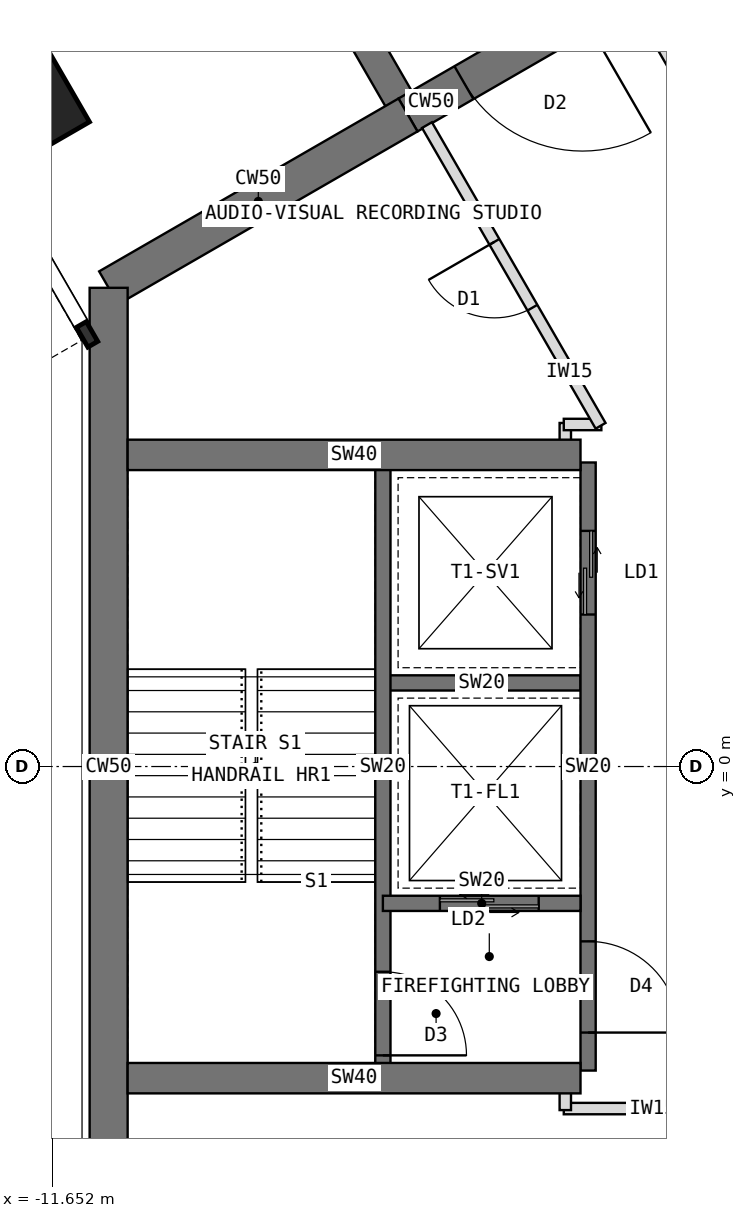
"""IFC4 building model, lengths in metres.
Left out: names, types, materials, properties, quantities, classifications, styles, units other than length and angle.
Written with IfcOpenShell. Run it as: python <this file> out.ifc"""

import sys

from ifc_helpers import new_model, si_unit, direction, frame, frame_2d, origin, origin_2d, place, context, subcontext, project, spatial, rectangle, extrude, element, fill, save


model = new_model("IFC4")
c1 = context("Model", 3, precision=1e-05, world=origin(), true_north=direction((0.0, 1.0)))
c2 = subcontext(c1, "Body", "Model", "MODEL_VIEW")
j1 = project(units=[si_unit("LENGTHUNIT", "METRE"), si_unit("PLANEANGLEUNIT", "RADIAN")], contexts=[c1])
p1 = place(None, origin())
s1 = spatial("IfcSite", under=j1, at=p1, CompositionType="ELEMENT")
p2 = place(p1, origin())
s2 = spatial("IfcBuilding", under=s1, at=p2, CompositionType="ELEMENT")
p3 = place(p2, frame((0.0, 0.0, 194.5)))
s3 = spatial("IfcBuildingStorey", under=s2, at=p3, CompositionType="ELEMENT", Elevation=194.5)
p4 = place(p3, frame((-3.939, 10.322, 0.0), z_axis=(0.0, 0.0, 1.0), x_axis=(-0.866019471182, -0.500010275428, 0.0)))
e1 = element("IfcWall", 1, at=p4, inside=s3, PredefinedType="SHEAR", context=c2, shape_type="SweptSolid", body=[
    extrude(rectangle(XDim=3.5, YDim=0.5, at=frame_2d((1.75, 0.0))), origin(), (0.0, 0.0, 1.0), 4.0),
])
p5 = place(p4, frame((0.85, 0.0, 0.0)))
e2 = element("IfcOpeningElement", 2, at=p5, cuts=e1, PredefinedType="OPENING", context=c2, shape_type="SweptSolid", body=[
    extrude(rectangle(XDim=1.8, YDim=2.1, at=frame_2d((0.9, 1.05))), frame((0.0, 0.26, 0.0), z_axis=(0.0, -1.0, 0.0), x_axis=(1.0, 0.0, 0.0)), (0.0, 0.0, 1.0), 0.52),
])
p6 = place(p3, frame((-6.97, 8.572, 0.0), z_axis=(0.0, 0.0, 1.0), x_axis=(-0.866034513004, -0.499984222037, 0.0)))
e3 = element("IfcWall", 3, at=p6, inside=s3, PredefinedType="SHEAR", context=c2, shape_type="SweptSolid", body=[
    extrude(rectangle(XDim=4.548, YDim=0.5, at=frame_2d((2.274, 0.0))), origin(), (0.0, 0.0, 1.0), 4.0),
])
p7 = place(p3, frame((-10.908, 6.298, 0.0), z_axis=(0.0, 0.0, 1.0), x_axis=(0.0, -1.0, 0.0)))
e4 = element("IfcWall", 4, at=p7, inside=s3, PredefinedType="SHEAR", context=c2, shape_type="SweptSolid", body=[
    extrude(rectangle(XDim=12.596, YDim=0.5, at=frame_2d((6.298, 0.0))), origin(), (0.0, 0.0, 1.0), 4.0),
])
p8 = place(p3, frame((-6.97, 8.572, 0.0), z_axis=(0.0, 0.0, 1.0), x_axis=(-0.499988811324, 0.866031863473, 0.0)))
e5 = element("IfcWall", 5, at=p8, inside=s3, PredefinedType="SHEAR", context=c2, shape_type="SweptSolid", body=[
    extrude(rectangle(XDim=2.592, YDim=0.4, at=frame_2d((1.296, 0.0))), origin(), (0.0, 0.0, 1.0), 4.0),
])
p9 = place(p3, frame((-11.946, 8.691, 0.0), z_axis=(0.0, 0.0, 1.0), x_axis=(0.866025403784, 0.5, 0.0)))
e6 = element("IfcColumn", 6, at=p9, inside=s3, PredefinedType="COLUMN", context=c2, shape_type="SweptSolid", body=[
    extrude(rectangle(XDim=1.15, YDim=1.15, at=origin_2d()), origin(), (0.0, 0.0, 1.0), 4.0),
])
p10 = place(p3, frame((-4.6, 4.0, 0.0), z_axis=(0.0, 0.0, 1.0), x_axis=(0.0, -1.0, 0.0)))
e7 = element("IfcWall", 7, at=p10, inside=s3, PredefinedType="SHEAR", context=c2, shape_type="SweptSolid", body=[
    extrude(rectangle(XDim=8.0, YDim=0.2, at=frame_2d((4.0, 0.0))), origin(), (0.0, 0.0, 1.0), 4.0),
])
p11 = place(p10, frame((6.3, 0.0, 0.0)))
e8 = element("IfcOpeningElement", 8, at=p11, cuts=e7, PredefinedType="OPENING", context=c2, shape_type="SweptSolid", body=[
    extrude(rectangle(XDim=1.2, YDim=2.1, at=frame_2d((0.6, 1.05))), frame((0.0, 0.11, 0.0), z_axis=(0.0, -1.0, 0.0), x_axis=(1.0, 0.0, 0.0)), (0.0, 0.0, 1.0), 0.22),
])
p12 = place(p10, frame((0.9, 0.0, 0.0)))
e9 = element("IfcOpeningElement", 9, at=p12, cuts=e7, PredefinedType="OPENING", context=c2, shape_type="SweptSolid", body=[
    extrude(rectangle(XDim=1.1, YDim=2.2, at=frame_2d((0.55, 1.1))), frame((0.0, 0.11, 0.0), z_axis=(0.0, -1.0, 0.0), x_axis=(1.0, 0.0, 0.0)), (0.0, 0.0, 1.0), 0.22),
])
p13 = place(p3, frame((-4.7, 1.1, 0.0), z_axis=(0.0, 0.0, 1.0), x_axis=(-1.0, 0.0, 0.0)))
e10 = element("IfcWall", 10, at=p13, inside=s3, PredefinedType="SHEAR", context=c2, shape_type="SweptSolid", body=[
    extrude(rectangle(XDim=2.6, YDim=0.2, at=frame_2d((1.3, 0.0))), origin(), (0.0, 0.0, 1.0), 4.0),
])
p14 = place(p3, frame((-4.7, -1.8, 0.0), z_axis=(0.0, 0.0, 1.0), x_axis=(-1.0, 0.0, 0.0)))
e11 = element("IfcWall", 11, at=p14, inside=s3, PredefinedType="SHEAR", context=c2, shape_type="SweptSolid", body=[
    extrude(rectangle(XDim=2.6, YDim=0.2, at=frame_2d((1.3, 0.0))), origin(), (0.0, 0.0, 1.0), 4.0),
])
p15 = place(p14, frame((0.55, 0.0, 0.0)))
e12 = element("IfcOpeningElement", 12, at=p15, cuts=e11, PredefinedType="OPENING", context=c2, shape_type="SweptSolid", body=[
    extrude(rectangle(XDim=1.3, YDim=2.2, at=frame_2d((0.65, 1.1))), frame((0.0, 0.11, 0.0), z_axis=(0.0, -1.0, 0.0), x_axis=(1.0, 0.0, 0.0)), (0.0, 0.0, 1.0), 0.22),
])
p16 = place(p3, frame((-7.3, 4.0, 0.0), z_axis=(0.0, 0.0, 1.0), x_axis=(0.0, -1.0, 0.0)))
e13 = element("IfcWall", 13, at=p16, inside=s3, PredefinedType="SHEAR", context=c2, shape_type="SweptSolid", body=[
    extrude(rectangle(XDim=8.0, YDim=0.2, at=frame_2d((4.0, 0.0))), origin(), (0.0, 0.0, 1.0), 4.0),
])
p17 = place(p16, frame((6.7, 0.0, 0.0)))
e14 = element("IfcOpeningElement", 14, at=p17, cuts=e13, PredefinedType="OPENING", context=c2, shape_type="SweptSolid", body=[
    extrude(rectangle(XDim=1.1, YDim=2.1, at=frame_2d((0.55, 1.05))), frame((0.0, 0.11, 0.0), z_axis=(0.0, -1.0, 0.0), x_axis=(1.0, 0.0, 0.0)), (0.0, 0.0, 1.0), 0.22),
])
for number, where, z_axis, x_axis in (
    (15, (-4.7, -4.1, 0.0), (0.0, 0.0, 1.0), (-1.0, 0.0, 0.0)),
    (16, (-4.7, 4.1, 0.0), (0.0, 0.0, 1.0), (-1.0, 0.0, 0.0)),
):
    element("IfcWall", number, at=place(p3, frame(where, z_axis=z_axis, x_axis=x_axis)), inside=s3, PredefinedType="SHEAR", context=c2, shape_type="SweptSolid", body=[
        extrude(rectangle(XDim=5.958, YDim=0.4, at=frame_2d((2.979, 0.0))), origin(), (0.0, 0.0, 1.0), 4.0),
    ])
p18 = place(p3, frame((-2.578, -4.5, 0.0), z_axis=(0.0, 0.0, 1.0), x_axis=(-1.0, 0.0, 0.0)))
e17 = element("IfcWall", 17, at=p18, inside=s3, PredefinedType="PARTITIONING", context=c2, shape_type="SweptSolid", body=[
    extrude(rectangle(XDim=2.342, YDim=0.15, at=frame_2d((1.171, 0.0))), origin(), (0.0, 0.0, 1.0), 3.8),
])
for number, where, z_axis, x_axis in (
    (18, (-4.9, -4.52, 0.0), (0.0, 0.0, 1.0), (0.0, 1.0, 0.0)),
    (19, (-4.9, 4.09, 0.0), (0.0, 0.0, 1.0), (0.0, 1.0, 0.0)),
):
    element("IfcWall", number, at=place(p3, frame(where, z_axis=z_axis, x_axis=x_axis)), inside=s3, PredefinedType="PARTITIONING", context=c2, shape_type="SweptSolid", body=[
        extrude(rectangle(XDim=0.43, YDim=0.15, at=frame_2d((0.215, 0.0))), origin(), (0.0, 0.0, 1.0), 3.8),
    ])
p19 = place(p3, frame((-4.92, 4.5, 0.0), z_axis=(0.0, 0.0, 1.0), x_axis=(1.0, 0.0, 0.0)))
e20 = element("IfcWall", 20, at=p19, inside=s3, PredefinedType="PARTITIONING", context=c2, shape_type="SweptSolid", body=[
    extrude(rectangle(XDim=0.494, YDim=0.15, at=frame_2d((0.247, 0.0))), origin(), (0.0, 0.0, 1.0), 3.8),
])
p20 = place(p3, frame((-4.436, 4.483, 0.0), z_axis=(0.0, 0.0, 1.0), x_axis=(-0.500001558674, 0.866024503882, 0.0)))
e21 = element("IfcWall", 21, at=p20, inside=s3, PredefinedType="PARTITIONING", context=c2, shape_type="SweptSolid", body=[
    extrude(rectangle(XDim=4.568, YDim=0.15, at=frame_2d((2.284, 0.0))), origin(), (0.0, 0.0, 1.0), 3.8),
])
p21 = place(p20, frame((1.794, 0.0, 0.0)))
e22 = element("IfcOpeningElement", 22, at=p21, cuts=e21, PredefinedType="OPENING", context=c2, shape_type="SweptSolid", body=[
    extrude(rectangle(XDim=1.0, YDim=2.1, at=frame_2d((0.5, 1.05))), frame((0.0, 0.085, 0.0), z_axis=(0.0, -1.0, 0.0), x_axis=(1.0, 0.0, 0.0)), (0.0, 0.0, 1.0), 0.17),
])
p22 = place(p3, frame((-3.948, 10.039, 0.0), z_axis=(0.0, 0.0, 1.0), x_axis=(0.500001558674, -0.866024503882, 0.0)))
e23 = element("IfcWall", 23, at=p22, inside=s3, PredefinedType="PARTITIONING", context=c2, shape_type="SweptSolid", body=[
    extrude(rectangle(XDim=4.568, YDim=0.15, at=frame_2d((2.284, 0.0))), origin(), (0.0, 0.0, 1.0), 3.8),
])
p23 = place(p22, frame((1.774, 0.0, 0.0)))
e24 = element("IfcOpeningElement", 24, at=p23, cuts=e23, PredefinedType="OPENING", context=c2, shape_type="SweptSolid", body=[
    extrude(rectangle(XDim=1.0, YDim=2.1, at=frame_2d((0.5, 1.05))), frame((0.0, 0.085, 0.0), z_axis=(0.0, -1.0, 0.0), x_axis=(1.0, 0.0, 0.0)), (0.0, 0.0, 1.0), 0.17),
])
p24 = place(p11, origin())
e25 = element("IfcDoor", 25, at=p24, inside=s3, OperationType="SINGLE_SWING_RIGHT", PredefinedType="DOOR", context=c2, shape_type="SweptSolid", body=[
    extrude(rectangle(XDim=1.2, YDim=2.1, at=frame_2d((0.6, 1.05))), frame((0.0, 0.025, 0.0), z_axis=(0.0, -1.0, 0.0), x_axis=(1.0, 0.0, 0.0)), (0.0, 0.0, 1.0), 0.05),
])
fill(e8, e25)
p25 = place(p15, origin())
e26 = element("IfcDoor", 26, at=p25, inside=s3, OperationType="DOUBLE_DOOR_SLIDING", PredefinedType="DOOR", context=c2, shape_type="SweptSolid", body=[
    extrude(rectangle(XDim=1.3, YDim=2.2, at=frame_2d((0.65, 1.1))), frame((0.0, 0.025, 0.0), z_axis=(0.0, -1.0, 0.0), x_axis=(1.0, 0.0, 0.0)), (0.0, 0.0, 1.0), 0.05),
])
fill(e12, e26)
p26 = place(p12, origin())
e27 = element("IfcDoor", 27, at=p26, inside=s3, OperationType="DOUBLE_DOOR_SLIDING", PredefinedType="DOOR", context=c2, shape_type="SweptSolid", body=[
    extrude(rectangle(XDim=1.1, YDim=2.2, at=frame_2d((0.55, 1.1))), frame((0.0, 0.025, 0.0), z_axis=(0.0, -1.0, 0.0), x_axis=(1.0, 0.0, 0.0)), (0.0, 0.0, 1.0), 0.05),
])
fill(e9, e27)
p27 = place(p17, origin())
e28 = element("IfcDoor", 28, at=p27, inside=s3, OperationType="SINGLE_SWING_RIGHT", PredefinedType="DOOR", context=c2, shape_type="SweptSolid", body=[
    extrude(rectangle(XDim=1.1, YDim=2.1, at=frame_2d((0.55, 1.05))), frame((0.0, 0.025, 0.0), z_axis=(0.0, -1.0, 0.0), x_axis=(1.0, 0.0, 0.0)), (0.0, 0.0, 1.0), 0.05),
])
fill(e14, e28)
p28 = place(p5, origin())
e29 = element("IfcDoor", 29, at=p28, inside=s3, OperationType="DOUBLE_DOOR_DOUBLE_SWING", PredefinedType="DOOR", context=c2, shape_type="SweptSolid", body=[
    extrude(rectangle(XDim=1.8, YDim=2.1, at=frame_2d((0.9, 1.05))), frame((0.0, 0.025, 0.0), z_axis=(0.0, -1.0, 0.0), x_axis=(1.0, 0.0, 0.0)), (0.0, 0.0, 1.0), 0.05),
])
fill(e2, e29)
p29 = place(p21, origin())
e30 = element("IfcDoor", 30, at=p29, inside=s3, OperationType="SINGLE_SWING_RIGHT", PredefinedType="DOOR", context=c2, shape_type="SweptSolid", body=[
    extrude(rectangle(XDim=1.0, YDim=2.1, at=frame_2d((0.5, 1.05))), frame((0.0, 0.025, 0.0), z_axis=(0.0, -1.0, 0.0), x_axis=(1.0, 0.0, 0.0)), (0.0, 0.0, 1.0), 0.05),
])
fill(e22, e30)
save(model, sys.argv[1])
